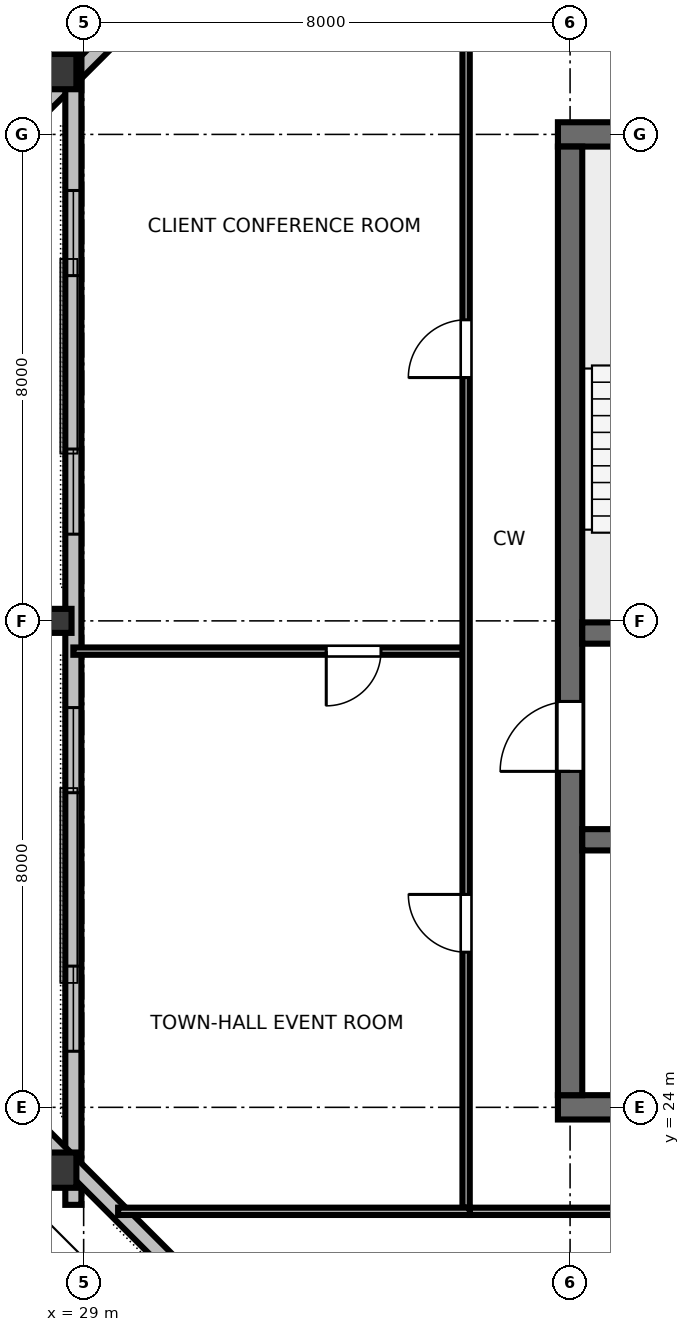
"""IFC4 building model, lengths in metres.
Left out: names, types, materials, properties, quantities, classifications, styles, units other than length and angle.
Written with IfcOpenShell. Run it as: python <this file> out.ifc"""

import sys

from ifc_helpers import new_model, si_unit, direction, frame, frame_2d, origin, origin_2d, place, context, subcontext, project, spatial, rectangle, hollow_rectangle, i_section, extrude, element, fill, save


model = new_model("IFC4")
c1 = context("Model", 3, precision=1e-05, world=origin(), true_north=direction((0.0, 1.0)))
c2 = subcontext(c1, "Body", "Model", "MODEL_VIEW")
j1 = project(units=[si_unit("LENGTHUNIT", "METRE"), si_unit("PLANEANGLEUNIT", "RADIAN")], contexts=[c1])
p1 = place(None, origin())
s1 = spatial("IfcSite", under=j1, at=p1, CompositionType="ELEMENT")
p2 = place(p1, origin())
s2 = spatial("IfcBuilding", under=s1, at=p2, CompositionType="ELEMENT")
p3 = place(p2, frame((0.0, 0.0, 275.4)))
s3 = spatial("IfcBuildingStorey", under=s2, at=p3, CompositionType="ELEMENT", Elevation=275.4)
p4 = place(p3, frame((36.8, 24.0, 0.0), z_axis=(0.0, 0.0, 1.0), x_axis=(1.0, 0.0, 0.0)))
e1 = element("IfcWall", 1, at=p4, inside=s3, PredefinedType="SHEAR", context=c2, shape_type="SweptSolid", body=[
    extrude(rectangle(XDim=18.4, YDim=0.4, at=frame_2d((9.2, 0.0))), origin(), (0.0, 0.0, 1.0), 3.28),
])
p5 = place(p4, frame((13.4, 0.0, 0.0)))
e2 = element("IfcOpeningElement", 2, at=p5, cuts=e1, PredefinedType="OPENING", context=c2, shape_type="SweptSolid", body=[
    extrude(rectangle(XDim=1.6, YDim=2.15, at=frame_2d((0.8, 1.075))), frame((0.0, 0.21, 0.0), z_axis=(0.0, -1.0, 0.0), x_axis=(1.0, 0.0, 0.0)), (0.0, 0.0, 1.0), 0.42),
])
p6 = place(p3, frame((36.8, 40.0, 0.0), z_axis=(0.0, 0.0, 1.0), x_axis=(1.0, 0.0, 0.0)))
e3 = element("IfcWall", 3, at=p6, inside=s3, PredefinedType="SHEAR", context=c2, shape_type="SweptSolid", body=[
    extrude(rectangle(XDim=18.4, YDim=0.4, at=frame_2d((9.2, 0.0))), origin(), (0.0, 0.0, 1.0), 3.28),
])
p7 = place(p6, frame((8.7, 0.0, 0.0)))
e4 = element("IfcOpeningElement", 4, at=p7, cuts=e3, PredefinedType="OPENING", context=c2, shape_type="SweptSolid", body=[
    extrude(rectangle(XDim=1.0, YDim=2.15, at=frame_2d((0.5, 1.075))), frame((0.0, 0.21, 0.0), z_axis=(0.0, -1.0, 0.0), x_axis=(1.0, 0.0, 0.0)), (0.0, 0.0, 1.0), 0.42),
])
p8 = place(p3, frame((37.0, 24.2, 0.0), z_axis=(0.0, 0.0, 1.0), x_axis=(0.0, 1.0, 0.0)))
e5 = element("IfcWall", 5, at=p8, inside=s3, PredefinedType="SHEAR", context=c2, shape_type="SweptSolid", body=[
    extrude(rectangle(XDim=15.6, YDim=0.4, at=frame_2d((7.8, 0.0))), origin(), (0.0, 0.0, 1.0), 3.28),
])
p9 = place(p8, frame((5.325, 0.0, 0.0)))
e6 = element("IfcOpeningElement", 6, at=p9, cuts=e5, PredefinedType="OPENING", context=c2, shape_type="SweptSolid", body=[
    extrude(rectangle(XDim=1.15, YDim=2.15, at=frame_2d((0.575, 1.075))), frame((0.0, 0.21, 0.0), z_axis=(0.0, -1.0, 0.0), x_axis=(1.0, 0.0, 0.0)), (0.0, 0.0, 1.0), 0.42),
])
p10 = place(p3, frame((37.2, 31.8, 0.0), z_axis=(0.0, 0.0, 1.0), x_axis=(1.0, 0.0, 0.0)))
e7 = element("IfcWall", 7, at=p10, inside=s3, PredefinedType="SHEAR", context=c2, shape_type="SweptSolid", body=[
    extrude(rectangle(XDim=17.6, YDim=0.35, at=frame_2d((8.8, 0.0))), origin(), (0.0, 0.0, 1.0), 3.28),
])
p11 = place(p10, frame((0.85, 0.0, 0.0)))
e8 = element("IfcOpeningElement", 8, at=p11, cuts=e7, PredefinedType="OPENING", context=c2, shape_type="SweptSolid", body=[
    extrude(rectangle(XDim=1.1, YDim=2.15, at=frame_2d((0.55, 1.075))), frame((0.0, 0.185, 0.0), z_axis=(0.0, -1.0, 0.0), x_axis=(1.0, 0.0, 0.0)), (0.0, 0.0, 1.0), 0.37),
])
p12 = place(p10, frame((14.75, 0.0, 0.0)))
e9 = element("IfcOpeningElement", 9, at=p12, cuts=e7, PredefinedType="OPENING", context=c2, shape_type="SweptSolid", body=[
    extrude(rectangle(XDim=1.1, YDim=2.15, at=frame_2d((0.55, 1.075))), frame((0.0, 0.185, 0.0), z_axis=(0.0, -1.0, 0.0), x_axis=(1.0, 0.0, 0.0)), (0.0, 0.0, 1.0), 0.37),
])
p13 = place(p3, frame((37.2, 28.4, 0.0), z_axis=(0.0, 0.0, 1.0), x_axis=(1.0, 0.0, 0.0)))
e10 = element("IfcWall", 10, at=p13, inside=s3, PredefinedType="SHEAR", context=c2, shape_type="SweptSolid", body=[
    extrude(rectangle(XDim=17.6, YDim=0.35, at=frame_2d((8.8, 0.0))), origin(), (0.0, 0.0, 1.0), 3.28),
])
p14 = place(p3, frame((28.531, 41.033, 0.0), z_axis=(0.124526454344, -0.108785128068, 0.986234737818), x_axis=(-0.742735851575, 0.648846987251, 0.165351268276)))
e11 = element("IfcColumn", 11, at=p14, inside=s3, PredefinedType="COLUMN", context=c2, shape_type="SweptSolid", body=[
    extrude(hollow_rectangle(XDim=0.58, YDim=0.7, WallThickness=0.032, at=origin_2d()), origin(), (0.0, 0.0, 1.0), 3.303),
])
p15 = place(p3, frame((28.611, 32.0, 0.0), z_axis=(0.124611214962, 0.0, 0.99220564658), x_axis=(-0.99220564658, 0.0, 0.124611214962)))
e12 = element("IfcColumn", 12, at=p15, inside=s3, PredefinedType="COLUMN", context=c2, shape_type="SweptSolid", body=[
    extrude(i_section(OverallWidth=0.395, OverallDepth=0.38, WebThickness=0.019, FlangeThickness=0.03, FilletRadius=0.025, at=origin_2d()), origin(), (0.0, 0.0, 1.0), 3.284),
])
p16 = place(p3, frame((28.531, 22.967, 0.0), z_axis=(0.124526454344, 0.108785128068, 0.986234737818), x_axis=(-0.742735851575, -0.648846987251, 0.165351268276)))
e13 = element("IfcColumn", 13, at=p16, inside=s3, PredefinedType="COLUMN", context=c2, shape_type="SweptSolid", body=[
    extrude(hollow_rectangle(XDim=0.58, YDim=0.7, WallThickness=0.032, at=origin_2d()), origin(), (0.0, 0.0, 1.0), 3.303),
])
p17 = place(p3, frame((36.253, 48.396, 0.0), z_axis=(0.0, 0.0, 1.0), x_axis=(-0.707106781187, -0.707106781187, 0.0)))
e14 = element("IfcWall", 14, at=p17, inside=s3, PredefinedType="STANDARD", context=c2, shape_type="SweptSolid", body=[
    extrude(rectangle(XDim=11.125, YDim=0.265, at=frame_2d((5.562, 0.0))), origin(), (0.0, 0.0, 1.0), 2.717),
])
p18 = place(p3, frame((28.831, 41.604, 0.0), z_axis=(0.0, 0.0, 1.0), x_axis=(0.0, -1.0, 0.0)))
e15 = element("IfcWall", 15, at=p18, inside=s3, PredefinedType="STANDARD", context=c2, shape_type="SweptSolid", body=[
    extrude(rectangle(XDim=19.207, YDim=0.265, at=frame_2d((9.604, 0.0))), origin(), (0.0, 0.0, 1.0), 2.717),
])
p19 = place(p18, frame((2.526, 0.0, 0.85)))
e16 = element("IfcOpeningElement", 16, at=p19, cuts=e15, PredefinedType="OPENING", context=c2, shape_type="SweptSolid", body=[
    extrude(rectangle(XDim=1.4, YDim=1.2, at=frame_2d((0.7, 0.6))), frame((0.0, 0.142, 0.0), z_axis=(0.0, -1.0, 0.0), x_axis=(1.0, 0.0, 0.0)), (0.0, 0.0, 1.0), 0.285),
])
p20 = place(p18, frame((6.778, 0.0, 0.85)))
e17 = element("IfcOpeningElement", 17, at=p20, cuts=e15, PredefinedType="OPENING", context=c2, shape_type="SweptSolid", body=[
    extrude(rectangle(XDim=1.4, YDim=1.2, at=frame_2d((0.7, 0.6))), frame((0.0, 0.142, 0.0), z_axis=(0.0, -1.0, 0.0), x_axis=(1.0, 0.0, 0.0)), (0.0, 0.0, 1.0), 0.285),
])
p21 = place(p18, frame((11.03, 0.0, 0.85)))
e18 = element("IfcOpeningElement", 18, at=p21, cuts=e15, PredefinedType="OPENING", context=c2, shape_type="SweptSolid", body=[
    extrude(rectangle(XDim=1.4, YDim=1.2, at=frame_2d((0.7, 0.6))), frame((0.0, 0.142, 0.0), z_axis=(0.0, -1.0, 0.0), x_axis=(1.0, 0.0, 0.0)), (0.0, 0.0, 1.0), 0.285),
])
p22 = place(p18, frame((15.281, 0.0, 0.85)))
e19 = element("IfcOpeningElement", 19, at=p22, cuts=e15, PredefinedType="OPENING", context=c2, shape_type="SweptSolid", body=[
    extrude(rectangle(XDim=1.4, YDim=1.2, at=frame_2d((0.7, 0.6))), frame((0.0, 0.142, 0.0), z_axis=(0.0, -1.0, 0.0), x_axis=(1.0, 0.0, 0.0)), (0.0, 0.0, 1.0), 0.285),
])
p23 = place(p3, frame((28.386, 23.471, 0.0), z_axis=(0.0, 0.0, 1.0), x_axis=(0.707106781187, -0.707106781187, 0.0)))
e20 = element("IfcWall", 20, at=p23, inside=s3, PredefinedType="STANDARD", context=c2, shape_type="SweptSolid", body=[
    extrude(rectangle(XDim=11.125, YDim=0.265, at=frame_2d((5.562, 0.0))), origin(), (0.0, 0.0, 1.0), 2.717),
])
p24 = place(p3, frame((35.35, 22.29, 0.0), z_axis=(0.0, 0.0, 1.0), x_axis=(1.0, 0.0, 0.0)))
e21 = element("IfcWall", 21, at=p24, inside=s3, PredefinedType="PARTITIONING", context=c2, shape_type="SweptSolid", body=[
    extrude(rectangle(XDim=21.3, YDim=0.12, at=frame_2d((10.65, 0.0))), origin(), (0.0, 0.0, 1.0), 2.54),
])
p25 = place(p24, frame((3.679, 0.0, 0.0)))
e22 = element("IfcOpeningElement", 22, at=p25, cuts=e21, PredefinedType="OPENING", context=c2, shape_type="SweptSolid", body=[
    extrude(rectangle(XDim=0.95, YDim=2.15, at=frame_2d((0.475, 1.075))), frame((0.0, 0.07, 0.0), z_axis=(0.0, -1.0, 0.0), x_axis=(1.0, 0.0, 0.0)), (0.0, 0.0, 1.0), 0.14),
])
p26 = place(p24, frame((16.191, 0.0, 0.0)))
e23 = element("IfcOpeningElement", 23, at=p26, cuts=e21, PredefinedType="OPENING", context=c2, shape_type="SweptSolid", body=[
    extrude(rectangle(XDim=0.95, YDim=2.15, at=frame_2d((0.475, 1.075))), frame((0.0, 0.07, 0.0), z_axis=(0.0, -1.0, 0.0), x_axis=(1.0, 0.0, 0.0)), (0.0, 0.0, 1.0), 0.14),
])
p27 = place(p3, frame((35.29, 31.503, 0.0), z_axis=(0.0, 0.0, 1.0), x_axis=(-1.0, 0.0, 0.0)))
e24 = element("IfcWall", 24, at=p27, inside=s3, PredefinedType="PARTITIONING", context=c2, shape_type="SweptSolid", body=[
    extrude(rectangle(XDim=6.459, YDim=0.12, at=frame_2d((3.229, 0.0))), origin(), (0.0, 0.0, 1.0), 2.54),
])
p28 = place(p27, frame((1.4, 0.0, 0.0)))
e25 = element("IfcOpeningElement", 25, at=p28, cuts=e24, PredefinedType="OPENING", context=c2, shape_type="SweptSolid", body=[
    extrude(rectangle(XDim=0.9, YDim=2.15, at=frame_2d((0.45, 1.075))), frame((0.0, 0.07, 0.0), z_axis=(0.0, -1.0, 0.0), x_axis=(1.0, 0.0, 0.0)), (0.0, 0.0, 1.0), 0.14),
])
p29 = place(p3, frame((35.29, 22.35, 0.0), z_axis=(0.0, 0.0, 1.0), x_axis=(0.0, 1.0, 0.0)))
e26 = element("IfcWall", 26, at=p29, inside=s3, PredefinedType="PARTITIONING", context=c2, shape_type="SweptSolid", body=[
    extrude(rectangle(XDim=19.3, YDim=0.12, at=frame_2d((9.65, 0.0))), origin(), (0.0, 0.0, 1.0), 2.54),
])
p30 = place(p29, frame((4.201, 0.0, 0.0)))
e27 = element("IfcOpeningElement", 27, at=p30, cuts=e26, PredefinedType="OPENING", context=c2, shape_type="SweptSolid", body=[
    extrude(rectangle(XDim=0.95, YDim=2.15, at=frame_2d((0.475, 1.075))), frame((0.0, 0.07, 0.0), z_axis=(0.0, -1.0, 0.0), x_axis=(1.0, 0.0, 0.0)), (0.0, 0.0, 1.0), 0.14),
])
p31 = place(p29, frame((13.651, 0.0, 0.0)))
e28 = element("IfcOpeningElement", 28, at=p31, cuts=e26, PredefinedType="OPENING", context=c2, shape_type="SweptSolid", body=[
    extrude(rectangle(XDim=0.95, YDim=2.15, at=frame_2d((0.475, 1.075))), frame((0.0, 0.07, 0.0), z_axis=(0.0, -1.0, 0.0), x_axis=(1.0, 0.0, 0.0)), (0.0, 0.0, 1.0), 0.14),
])
p32 = place(p3, frame((35.35, 22.29, 0.0), z_axis=(0.0, 0.0, 1.0), x_axis=(-1.0, 0.0, 0.0)))
e29 = element("IfcWall", 29, at=p32, inside=s3, PredefinedType="PARTITIONING", context=c2, shape_type="SweptSolid", body=[
    extrude(rectangle(XDim=5.783, YDim=0.12, at=frame_2d((2.892, 0.0))), origin(), (0.0, 0.0, 1.0), 2.54),
])
p33 = place(p19, origin())
e30 = element("IfcWindow", 30, at=p33, inside=s3, PartitioningType="SINGLE_PANEL", PredefinedType="WINDOW", context=c2, shape_type="SweptSolid", body=[
    extrude(rectangle(XDim=1.4, YDim=1.2, at=frame_2d((0.7, 0.6))), frame((0.0, 0.03, 0.0), z_axis=(0.0, -1.0, 0.0), x_axis=(1.0, 0.0, 0.0)), (0.0, 0.0, 1.0), 0.06),
])
fill(e16, e30)
p34 = place(p20, origin())
e31 = element("IfcWindow", 31, at=p34, inside=s3, PartitioningType="SINGLE_PANEL", PredefinedType="WINDOW", context=c2, shape_type="SweptSolid", body=[
    extrude(rectangle(XDim=1.4, YDim=1.2, at=frame_2d((0.7, 0.6))), frame((0.0, 0.03, 0.0), z_axis=(0.0, -1.0, 0.0), x_axis=(1.0, 0.0, 0.0)), (0.0, 0.0, 1.0), 0.06),
])
fill(e17, e31)
p35 = place(p21, origin())
e32 = element("IfcWindow", 32, at=p35, inside=s3, PartitioningType="SINGLE_PANEL", PredefinedType="WINDOW", context=c2, shape_type="SweptSolid", body=[
    extrude(rectangle(XDim=1.4, YDim=1.2, at=frame_2d((0.7, 0.6))), frame((0.0, 0.03, 0.0), z_axis=(0.0, -1.0, 0.0), x_axis=(1.0, 0.0, 0.0)), (0.0, 0.0, 1.0), 0.06),
])
fill(e18, e32)
p36 = place(p22, origin())
e33 = element("IfcWindow", 33, at=p36, inside=s3, PartitioningType="SINGLE_PANEL", PredefinedType="WINDOW", context=c2, shape_type="SweptSolid", body=[
    extrude(rectangle(XDim=1.4, YDim=1.2, at=frame_2d((0.7, 0.6))), frame((0.0, 0.03, 0.0), z_axis=(0.0, -1.0, 0.0), x_axis=(1.0, 0.0, 0.0)), (0.0, 0.0, 1.0), 0.06),
])
fill(e19, e33)
p37 = place(p9, origin())
e34 = element("IfcDoor", 34, at=p37, inside=s3, OperationType="SINGLE_SWING_LEFT", PredefinedType="DOOR", context=c2, shape_type="SweptSolid", body=[
    extrude(rectangle(XDim=1.15, YDim=2.15, at=frame_2d((0.575, 1.075))), frame((0.0, 0.025, 0.0), z_axis=(0.0, -1.0, 0.0), x_axis=(1.0, 0.0, 0.0)), (0.0, 0.0, 1.0), 0.05),
])
fill(e6, e34)
p38 = place(p28, origin())
e35 = element("IfcDoor", 35, at=p38, inside=s3, OperationType="SINGLE_SWING_RIGHT", PredefinedType="DOOR", context=c2, shape_type="SweptSolid", body=[
    extrude(rectangle(XDim=0.9, YDim=2.15, at=frame_2d((0.45, 1.075))), frame((0.0, 0.025, 0.0), z_axis=(0.0, -1.0, 0.0), x_axis=(1.0, 0.0, 0.0)), (0.0, 0.0, 1.0), 0.05),
])
fill(e25, e35)
p39 = place(p30, origin())
e36 = element("IfcDoor", 36, at=p39, inside=s3, OperationType="SINGLE_SWING_RIGHT", PredefinedType="DOOR", context=c2, shape_type="SweptSolid", body=[
    extrude(rectangle(XDim=0.95, YDim=2.15, at=frame_2d((0.475, 1.075))), frame((0.0, 0.025, 0.0), z_axis=(0.0, -1.0, 0.0), x_axis=(1.0, 0.0, 0.0)), (0.0, 0.0, 1.0), 0.05),
])
fill(e27, e36)
p40 = place(p31, origin())
e37 = element("IfcDoor", 37, at=p40, inside=s3, OperationType="SINGLE_SWING_LEFT", PredefinedType="DOOR", context=c2, shape_type="SweptSolid", body=[
    extrude(rectangle(XDim=0.95, YDim=2.15, at=frame_2d((0.475, 1.075))), frame((0.0, 0.025, 0.0), z_axis=(0.0, -1.0, 0.0), x_axis=(1.0, 0.0, 0.0)), (0.0, 0.0, 1.0), 0.05),
])
fill(e28, e37)
save(model, sys.argv[1])
